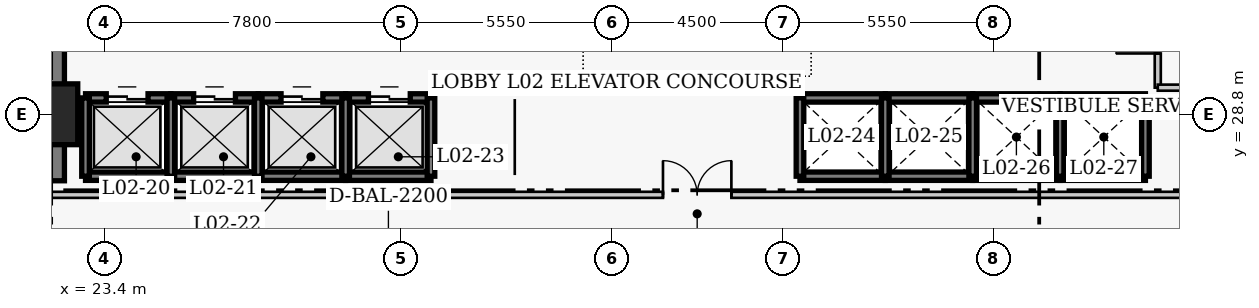
"""IFC4 building model, lengths in metres.
Left out: names, types, materials, properties, quantities, classifications, styles, units other than length and angle.
Written with IfcOpenShell. Run it as: python <this file> out.ifc"""

import sys

from ifc_helpers import new_model, si_unit, direction, frame, frame_2d, origin, origin_2d, place, context, subcontext, project, spatial, rectangle, extrude, element, fill, save


model = new_model("IFC4")
c1 = context("Model", 3, precision=1e-05, world=origin(), true_north=direction((0.0, 1.0)))
c2 = subcontext(c1, "Body", "Model", "MODEL_VIEW")
j1 = project(units=[si_unit("LENGTHUNIT", "METRE"), si_unit("PLANEANGLEUNIT", "RADIAN")], contexts=[c1])
p1 = place(None, origin())
s1 = spatial("IfcSite", under=j1, at=p1, CompositionType="ELEMENT")
p2 = place(p1, origin())
s2 = spatial("IfcBuilding", under=s1, at=p2, CompositionType="ELEMENT")
p3 = place(p2, frame((0.0, 0.0, 10.4)))
s3 = spatial("IfcBuildingStorey", under=s2, at=p3, CompositionType="ELEMENT", Elevation=10.4)
p4 = place(p3, frame((21.9, 27.05, 0.0), z_axis=(0.0, 0.0, 1.0), x_axis=(0.0, 1.0, 0.0)))
e1 = element("IfcWall", 1, at=p4, inside=s3, PredefinedType="SHEAR", context=c2, shape_type="SweptSolid", body=[
    extrude(rectangle(XDim=13.72, YDim=0.9, at=frame_2d((6.86, 0.0))), origin(), (0.0, 0.0, 1.0), 5.4),
])
p5 = place(p3, frame((21.9, 28.8, 0.0), z_axis=(0.0, 0.0, 1.0), x_axis=(1.0, 0.0, 0.0)))
e2 = element("IfcColumn", 2, at=p5, inside=s3, PredefinedType="COLUMN", context=c2, shape_type="SweptSolid", body=[
    extrude(rectangle(XDim=1.6, YDim=1.6, at=origin_2d()), origin(), (0.0, 0.0, 1.0), 5.4),
])
p6 = place(p3, frame((22.905, 29.23, 0.0), z_axis=(0.0, 0.0, 1.0), x_axis=(1.0, 0.0, 0.0)))
e3 = element("IfcWall", 3, at=p6, inside=s3, PredefinedType="SHEAR", context=c2, shape_type="SweptSolid", body=[
    extrude(rectangle(XDim=2.245, YDim=0.22, at=frame_2d((1.123, 0.0))), origin(), (0.0, 0.0, 1.0), 5.4),
])
p7 = place(p6, frame((0.545, 0.0, 0.0)))
e4 = element("IfcOpeningElement", 4, at=p7, cuts=e3, PredefinedType="OPENING", context=c2, shape_type="SweptSolid", body=[
    extrude(rectangle(XDim=1.1, YDim=2.15, at=frame_2d((0.55, 1.075))), frame((0.0, 0.12, 0.0), z_axis=(0.0, -1.0, 0.0), x_axis=(1.0, 0.0, 0.0)), (0.0, 0.0, 1.0), 0.24),
])
p8 = place(p3, frame((22.905, 27.17, 0.0), z_axis=(0.0, 0.0, 1.0), x_axis=(1.0, 0.0, 0.0)))
e5 = element("IfcWall", 5, at=p8, inside=s3, PredefinedType="SHEAR", context=c2, shape_type="SweptSolid", body=[
    extrude(rectangle(XDim=2.245, YDim=0.22, at=frame_2d((1.123, 0.0))), origin(), (0.0, 0.0, 1.0), 5.4),
])
p9 = place(p3, frame((22.905, 27.17, 0.0), z_axis=(0.0, 0.0, 1.0), x_axis=(0.0, 1.0, 0.0)))
e6 = element("IfcWall", 6, at=p9, inside=s3, PredefinedType="SHEAR", context=c2, shape_type="SweptSolid", body=[
    extrude(rectangle(XDim=2.06, YDim=0.2, at=frame_2d((1.03, 0.0))), origin(), (0.0, 0.0, 1.0), 5.4),
])
p10 = place(p3, frame((25.15, 29.23, 0.0), z_axis=(0.0, 0.0, 1.0), x_axis=(1.0, 0.0, 0.0)))
e7 = element("IfcWall", 7, at=p10, inside=s3, PredefinedType="SHEAR", context=c2, shape_type="SweptSolid", body=[
    extrude(rectangle(XDim=2.3, YDim=0.22, at=frame_2d((1.15, 0.0))), origin(), (0.0, 0.0, 1.0), 5.4),
])
p11 = place(p10, frame((0.6, 0.0, 0.0)))
e8 = element("IfcOpeningElement", 8, at=p11, cuts=e7, PredefinedType="OPENING", context=c2, shape_type="SweptSolid", body=[
    extrude(rectangle(XDim=1.1, YDim=2.15, at=frame_2d((0.55, 1.075))), frame((0.0, 0.12, 0.0), z_axis=(0.0, -1.0, 0.0), x_axis=(1.0, 0.0, 0.0)), (0.0, 0.0, 1.0), 0.24),
])
p12 = place(p3, frame((25.15, 27.17, 0.0), z_axis=(0.0, 0.0, 1.0), x_axis=(1.0, 0.0, 0.0)))
e9 = element("IfcWall", 9, at=p12, inside=s3, PredefinedType="SHEAR", context=c2, shape_type="SweptSolid", body=[
    extrude(rectangle(XDim=2.3, YDim=0.22, at=frame_2d((1.15, 0.0))), origin(), (0.0, 0.0, 1.0), 5.4),
])
p13 = place(p3, frame((25.15, 27.17, 0.0), z_axis=(0.0, 0.0, 1.0), x_axis=(0.0, 1.0, 0.0)))
e10 = element("IfcWall", 10, at=p13, inside=s3, PredefinedType="SHEAR", context=c2, shape_type="SweptSolid", body=[
    extrude(rectangle(XDim=2.06, YDim=0.2, at=frame_2d((1.03, 0.0))), origin(), (0.0, 0.0, 1.0), 5.4),
])
p14 = place(p3, frame((27.45, 29.23, 0.0), z_axis=(0.0, 0.0, 1.0), x_axis=(1.0, 0.0, 0.0)))
e11 = element("IfcWall", 11, at=p14, inside=s3, PredefinedType="SHEAR", context=c2, shape_type="SweptSolid", body=[
    extrude(rectangle(XDim=2.3, YDim=0.22, at=frame_2d((1.15, 0.0))), origin(), (0.0, 0.0, 1.0), 5.4),
])
p15 = place(p14, frame((0.6, 0.0, 0.0)))
e12 = element("IfcOpeningElement", 12, at=p15, cuts=e11, PredefinedType="OPENING", context=c2, shape_type="SweptSolid", body=[
    extrude(rectangle(XDim=1.1, YDim=2.15, at=frame_2d((0.55, 1.075))), frame((0.0, 0.12, 0.0), z_axis=(0.0, -1.0, 0.0), x_axis=(1.0, 0.0, 0.0)), (0.0, 0.0, 1.0), 0.24),
])
p16 = place(p3, frame((27.45, 27.17, 0.0), z_axis=(0.0, 0.0, 1.0), x_axis=(1.0, 0.0, 0.0)))
e13 = element("IfcWall", 13, at=p16, inside=s3, PredefinedType="SHEAR", context=c2, shape_type="SweptSolid", body=[
    extrude(rectangle(XDim=2.3, YDim=0.22, at=frame_2d((1.15, 0.0))), origin(), (0.0, 0.0, 1.0), 5.4),
])
p17 = place(p3, frame((27.45, 27.17, 0.0), z_axis=(0.0, 0.0, 1.0), x_axis=(0.0, 1.0, 0.0)))
e14 = element("IfcWall", 14, at=p17, inside=s3, PredefinedType="SHEAR", context=c2, shape_type="SweptSolid", body=[
    extrude(rectangle(XDim=2.06, YDim=0.2, at=frame_2d((1.03, 0.0))), origin(), (0.0, 0.0, 1.0), 5.4),
])
p18 = place(p3, frame((29.75, 29.23, 0.0), z_axis=(0.0, 0.0, 1.0), x_axis=(1.0, 0.0, 0.0)))
e15 = element("IfcWall", 15, at=p18, inside=s3, PredefinedType="SHEAR", context=c2, shape_type="SweptSolid", body=[
    extrude(rectangle(XDim=2.245, YDim=0.22, at=frame_2d((1.123, 0.0))), origin(), (0.0, 0.0, 1.0), 5.4),
])
p19 = place(p18, frame((0.6, 0.0, 0.0)))
e16 = element("IfcOpeningElement", 16, at=p19, cuts=e15, PredefinedType="OPENING", context=c2, shape_type="SweptSolid", body=[
    extrude(rectangle(XDim=1.1, YDim=2.15, at=frame_2d((0.55, 1.075))), frame((0.0, 0.12, 0.0), z_axis=(0.0, -1.0, 0.0), x_axis=(1.0, 0.0, 0.0)), (0.0, 0.0, 1.0), 0.24),
])
p20 = place(p3, frame((29.75, 27.17, 0.0), z_axis=(0.0, 0.0, 1.0), x_axis=(1.0, 0.0, 0.0)))
e17 = element("IfcWall", 17, at=p20, inside=s3, PredefinedType="SHEAR", context=c2, shape_type="SweptSolid", body=[
    extrude(rectangle(XDim=2.245, YDim=0.22, at=frame_2d((1.123, 0.0))), origin(), (0.0, 0.0, 1.0), 5.4),
])
for number, where, z_axis, x_axis in (
    (18, (29.75, 27.17, 0.0), (0.0, 0.0, 1.0), (0.0, 1.0, 0.0)),
    (19, (31.995, 27.17, 0.0), (0.0, 0.0, 1.0), (0.0, 1.0, 0.0)),
):
    element("IfcWall", number, at=place(p3, frame(where, z_axis=z_axis, x_axis=x_axis)), inside=s3, PredefinedType="SHEAR", context=c2, shape_type="SweptSolid", body=[
        extrude(rectangle(XDim=2.06, YDim=0.2, at=frame_2d((1.03, 0.0))), origin(), (0.0, 0.0, 1.0), 5.4),
    ])
for number, where, z_axis, x_axis in (
    (20, (41.705, 29.23, 0.0), (0.0, 0.0, 1.0), (1.0, 0.0, 0.0)),
    (21, (41.705, 27.17, 0.0), (0.0, 0.0, 1.0), (1.0, 0.0, 0.0)),
):
    element("IfcWall", number, at=place(p3, frame(where, z_axis=z_axis, x_axis=x_axis)), inside=s3, PredefinedType="SHEAR", context=c2, shape_type="SweptSolid", body=[
        extrude(rectangle(XDim=2.245, YDim=0.22, at=frame_2d((1.123, 0.0))), origin(), (0.0, 0.0, 1.0), 5.4),
    ])
p21 = place(p3, frame((41.705, 27.17, 0.0), z_axis=(0.0, 0.0, 1.0), x_axis=(0.0, 1.0, 0.0)))
e22 = element("IfcWall", 22, at=p21, inside=s3, PredefinedType="SHEAR", context=c2, shape_type="SweptSolid", body=[
    extrude(rectangle(XDim=2.06, YDim=0.2, at=frame_2d((1.03, 0.0))), origin(), (0.0, 0.0, 1.0), 5.4),
])
for number, where, z_axis, x_axis in (
    (23, (43.95, 29.23, 0.0), (0.0, 0.0, 1.0), (1.0, 0.0, 0.0)),
    (24, (43.95, 27.17, 0.0), (0.0, 0.0, 1.0), (1.0, 0.0, 0.0)),
):
    element("IfcWall", number, at=place(p3, frame(where, z_axis=z_axis, x_axis=x_axis)), inside=s3, PredefinedType="SHEAR", context=c2, shape_type="SweptSolid", body=[
        extrude(rectangle(XDim=2.3, YDim=0.22, at=frame_2d((1.15, 0.0))), origin(), (0.0, 0.0, 1.0), 5.4),
    ])
p22 = place(p3, frame((43.95, 27.17, 0.0), z_axis=(0.0, 0.0, 1.0), x_axis=(0.0, 1.0, 0.0)))
e25 = element("IfcWall", 25, at=p22, inside=s3, PredefinedType="SHEAR", context=c2, shape_type="SweptSolid", body=[
    extrude(rectangle(XDim=2.06, YDim=0.2, at=frame_2d((1.03, 0.0))), origin(), (0.0, 0.0, 1.0), 5.4),
])
for number, where, z_axis, x_axis in (
    (26, (46.25, 29.23, 0.0), (0.0, 0.0, 1.0), (1.0, 0.0, 0.0)),
    (27, (46.25, 27.17, 0.0), (0.0, 0.0, 1.0), (1.0, 0.0, 0.0)),
):
    element("IfcWall", number, at=place(p3, frame(where, z_axis=z_axis, x_axis=x_axis)), inside=s3, PredefinedType="SHEAR", context=c2, shape_type="SweptSolid", body=[
        extrude(rectangle(XDim=2.3, YDim=0.22, at=frame_2d((1.15, 0.0))), origin(), (0.0, 0.0, 1.0), 5.4),
    ])
p23 = place(p3, frame((46.25, 27.17, 0.0), z_axis=(0.0, 0.0, 1.0), x_axis=(0.0, 1.0, 0.0)))
e28 = element("IfcWall", 28, at=p23, inside=s3, PredefinedType="SHEAR", context=c2, shape_type="SweptSolid", body=[
    extrude(rectangle(XDim=2.06, YDim=0.2, at=frame_2d((1.03, 0.0))), origin(), (0.0, 0.0, 1.0), 5.4),
])
for number, where, z_axis, x_axis in (
    (29, (48.55, 29.23, 0.0), (0.0, 0.0, 1.0), (1.0, 0.0, 0.0)),
    (30, (48.55, 27.17, 0.0), (0.0, 0.0, 1.0), (1.0, 0.0, 0.0)),
):
    element("IfcWall", number, at=place(p3, frame(where, z_axis=z_axis, x_axis=x_axis)), inside=s3, PredefinedType="SHEAR", context=c2, shape_type="SweptSolid", body=[
        extrude(rectangle(XDim=2.245, YDim=0.22, at=frame_2d((1.123, 0.0))), origin(), (0.0, 0.0, 1.0), 5.4),
    ])
for number, where, z_axis, x_axis in (
    (31, (48.55, 27.17, 0.0), (0.0, 0.0, 1.0), (0.0, 1.0, 0.0)),
    (32, (50.795, 27.17, 0.0), (0.0, 0.0, 1.0), (0.0, 1.0, 0.0)),
):
    element("IfcWall", number, at=place(p3, frame(where, z_axis=z_axis, x_axis=x_axis)), inside=s3, PredefinedType="SHEAR", context=c2, shape_type="SweptSolid", body=[
        extrude(rectangle(XDim=2.06, YDim=0.2, at=frame_2d((1.03, 0.0))), origin(), (0.0, 0.0, 1.0), 5.4),
    ])
p24 = place(p3, frame((51.12, 29.5, 0.0), z_axis=(0.0, 0.0, 1.0), x_axis=(0.0, 1.0, 0.0)))
e33 = element("IfcWall", 33, at=p24, inside=s3, PredefinedType="PARTITIONING", context=c2, shape_type="SweptSolid", body=[
    extrude(rectangle(XDim=3.7, YDim=0.16, at=frame_2d((1.85, 0.0))), origin(), (0.0, 0.0, 1.0), 5.1),
])
p25 = place(p24, frame((0.9, 0.0, 0.0)))
e34 = element("IfcOpeningElement", 34, at=p25, cuts=e33, PredefinedType="OPENING", context=c2, shape_type="SweptSolid", body=[
    extrude(rectangle(XDim=1.1, YDim=2.15, at=frame_2d((0.55, 1.075))), frame((0.0, 0.09, 0.0), z_axis=(0.0, -1.0, 0.0), x_axis=(1.0, 0.0, 0.0)), (0.0, 0.0, 1.0), 0.18),
])
p26 = place(p3, frame((51.12, 29.5, 0.0), z_axis=(0.0, 0.0, 1.0), x_axis=(1.0, 0.0, 0.0)))
e35 = element("IfcWall", 35, at=p26, inside=s3, PredefinedType="PARTITIONING", context=c2, shape_type="SweptSolid", body=[
    extrude(rectangle(XDim=5.63, YDim=0.16, at=frame_2d((2.815, 0.0))), origin(), (0.0, 0.0, 1.0), 5.1),
])
p27 = place(p3, frame((-2.98, 26.68, 0.0), z_axis=(0.0, 0.0, 1.0), x_axis=(1.0, 0.0, 0.0)))
e36 = element("IfcWall", 36, at=p27, inside=s3, PredefinedType="PARTITIONING", context=c2, shape_type="SweptSolid", body=[
    extrude(rectangle(XDim=83.96, YDim=0.16, at=frame_2d((41.98, 0.0))), origin(), (0.0, 0.0, 1.0), 5.1),
])
p28 = place(p27, frame((41.08, 0.0, 0.0)))
e37 = element("IfcOpeningElement", 37, at=p28, cuts=e36, PredefinedType="OPENING", context=c2, shape_type="SweptSolid", body=[
    extrude(rectangle(XDim=1.8, YDim=2.2, at=frame_2d((0.9, 1.1))), frame((0.0, 0.09, 0.0), z_axis=(0.0, -1.0, 0.0), x_axis=(1.0, 0.0, 0.0)), (0.0, 0.0, 1.0), 0.18),
])
p29 = place(p27, frame((4.042, 0.0, 0.0)))
e38 = element("IfcOpeningElement", 38, at=p29, cuts=e36, PredefinedType="OPENING", context=c2, shape_type="SweptSolid", body=[
    extrude(rectangle(XDim=1.8, YDim=2.2, at=frame_2d((0.9, 1.1))), frame((0.0, 0.09, 0.0), z_axis=(0.0, -1.0, 0.0), x_axis=(1.0, 0.0, 0.0)), (0.0, 0.0, 1.0), 0.18),
])
p30 = place(p27, frame((61.48, 0.0, 0.0)))
e39 = element("IfcOpeningElement", 39, at=p30, cuts=e36, PredefinedType="OPENING", context=c2, shape_type="SweptSolid", body=[
    extrude(rectangle(XDim=1.8, YDim=2.2, at=frame_2d((0.9, 1.1))), frame((0.0, 0.09, 0.0), z_axis=(0.0, -1.0, 0.0), x_axis=(1.0, 0.0, 0.0)), (0.0, 0.0, 1.0), 0.18),
])
p31 = place(p7, origin())
e40 = element("IfcDoor", 40, at=p31, inside=s3, OperationType="DOUBLE_DOOR_SLIDING", PredefinedType="DOOR", context=c2, shape_type="SweptSolid", body=[
    extrude(rectangle(XDim=1.1, YDim=2.15, at=frame_2d((0.55, 1.075))), frame((0.0, 0.025, 0.0), z_axis=(0.0, -1.0, 0.0), x_axis=(1.0, 0.0, 0.0)), (0.0, 0.0, 1.0), 0.05),
])
fill(e4, e40)
p32 = place(p11, origin())
e41 = element("IfcDoor", 41, at=p32, inside=s3, OperationType="DOUBLE_DOOR_SLIDING", PredefinedType="DOOR", context=c2, shape_type="SweptSolid", body=[
    extrude(rectangle(XDim=1.1, YDim=2.15, at=frame_2d((0.55, 1.075))), frame((0.0, 0.025, 0.0), z_axis=(0.0, -1.0, 0.0), x_axis=(1.0, 0.0, 0.0)), (0.0, 0.0, 1.0), 0.05),
])
fill(e8, e41)
p33 = place(p15, origin())
e42 = element("IfcDoor", 42, at=p33, inside=s3, OperationType="DOUBLE_DOOR_SLIDING", PredefinedType="DOOR", context=c2, shape_type="SweptSolid", body=[
    extrude(rectangle(XDim=1.1, YDim=2.15, at=frame_2d((0.55, 1.075))), frame((0.0, 0.025, 0.0), z_axis=(0.0, -1.0, 0.0), x_axis=(1.0, 0.0, 0.0)), (0.0, 0.0, 1.0), 0.05),
])
fill(e12, e42)
p34 = place(p19, origin())
e43 = element("IfcDoor", 43, at=p34, inside=s3, OperationType="DOUBLE_DOOR_SLIDING", PredefinedType="DOOR", context=c2, shape_type="SweptSolid", body=[
    extrude(rectangle(XDim=1.1, YDim=2.15, at=frame_2d((0.55, 1.075))), frame((0.0, 0.025, 0.0), z_axis=(0.0, -1.0, 0.0), x_axis=(1.0, 0.0, 0.0)), (0.0, 0.0, 1.0), 0.05),
])
fill(e16, e43)
p35 = place(p25, origin())
e44 = element("IfcDoor", 44, at=p35, inside=s3, OperationType="SINGLE_SWING_LEFT", PredefinedType="DOOR", context=c2, shape_type="SweptSolid", body=[
    extrude(rectangle(XDim=1.1, YDim=2.15, at=frame_2d((0.55, 1.075))), frame((0.0, 0.025, 0.0), z_axis=(0.0, -1.0, 0.0), x_axis=(1.0, 0.0, 0.0)), (0.0, 0.0, 1.0), 0.05),
])
fill(e34, e44)
p36 = place(p28, origin())
e45 = element("IfcDoor", 45, at=p36, inside=s3, OperationType="DOUBLE_DOOR_SINGLE_SWING", PredefinedType="DOOR", context=c2, shape_type="SweptSolid", body=[
    extrude(rectangle(XDim=1.8, YDim=2.2, at=frame_2d((0.9, 1.1))), frame((0.0, 0.025, 0.0), z_axis=(0.0, -1.0, 0.0), x_axis=(1.0, 0.0, 0.0)), (0.0, 0.0, 1.0), 0.05),
])
fill(e37, e45)
save(model, sys.argv[1])
